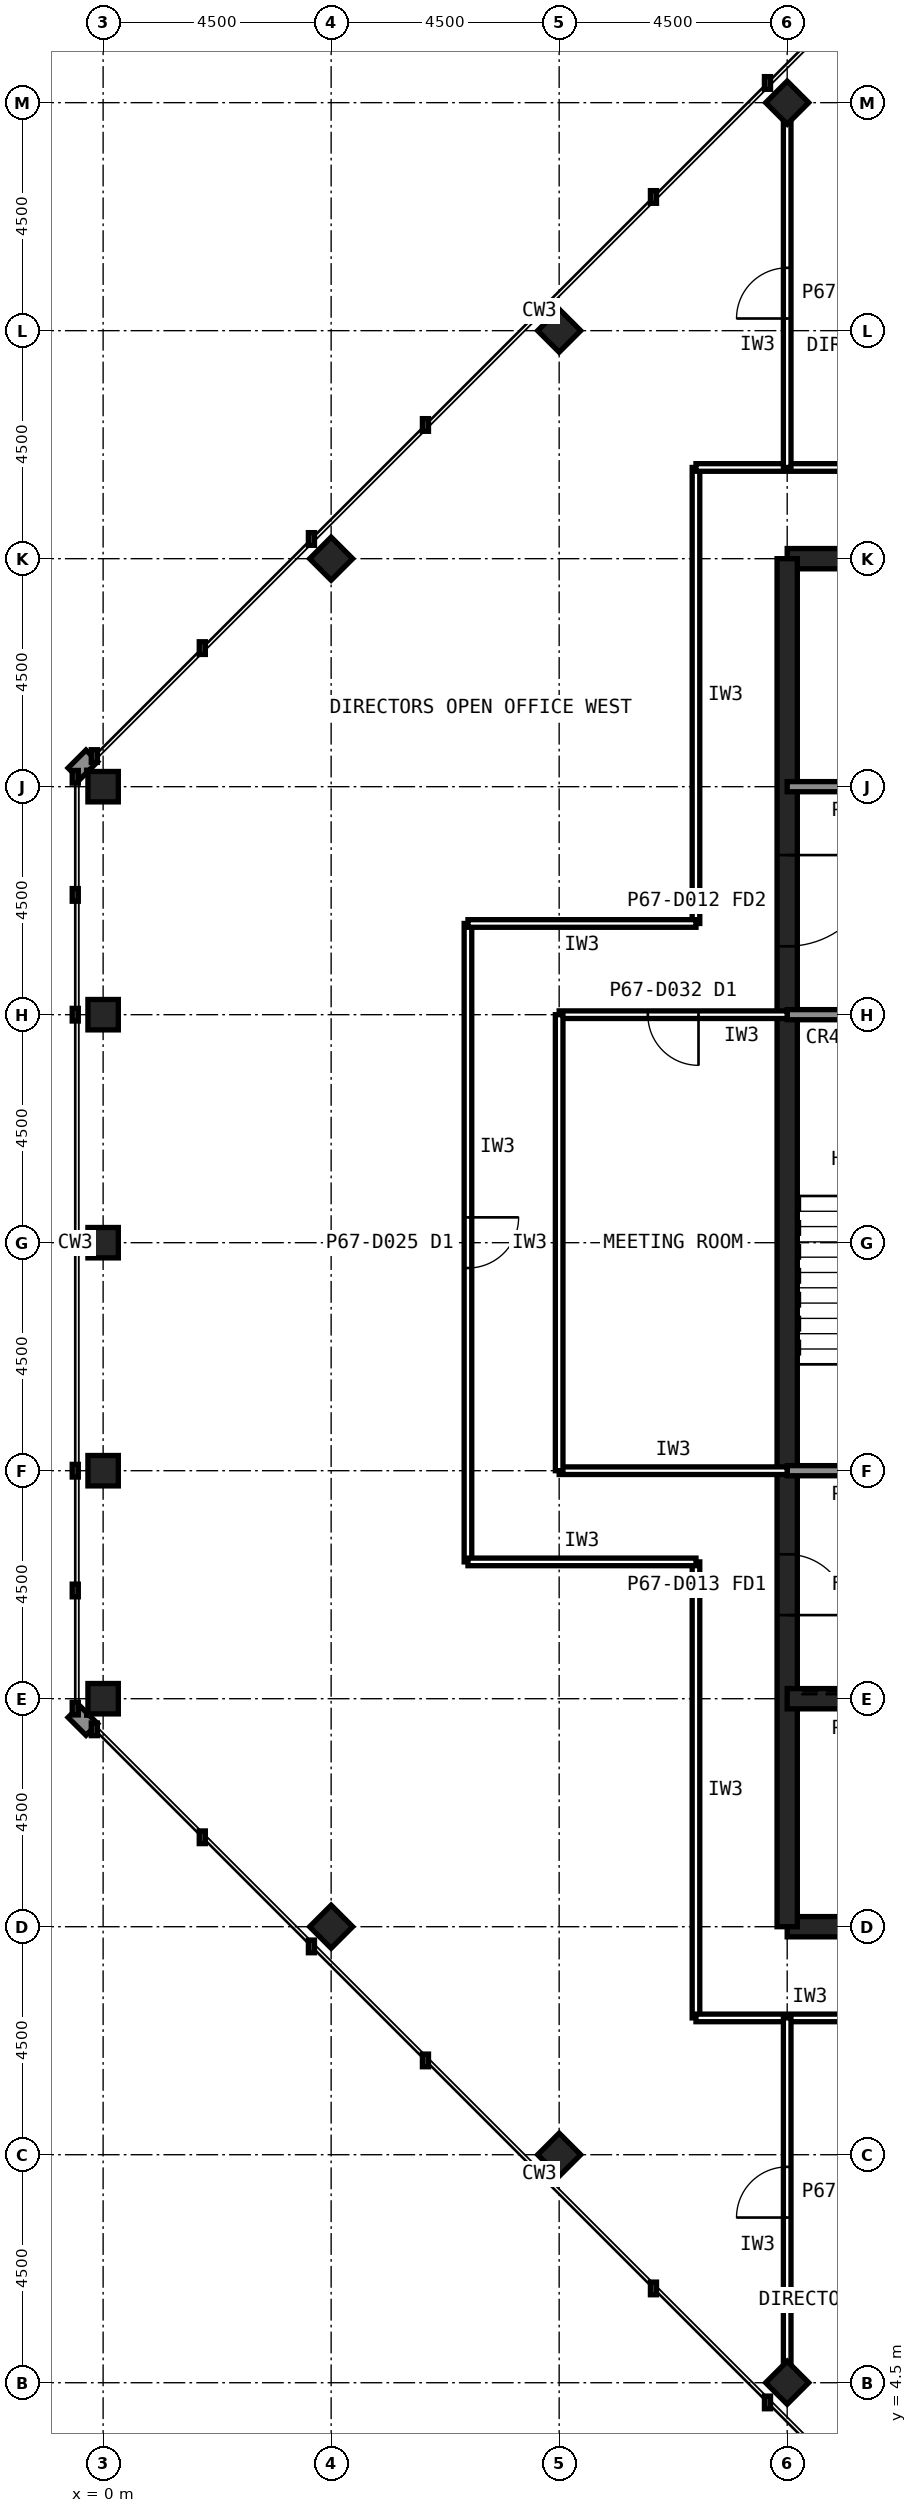
"""IFC4 building model, lengths in metres.
Left out: names, types, materials, properties, quantities, classifications, styles, units other than length and angle.
Written with IfcOpenShell. Run it as: python <this file> out.ifc"""

import sys

from ifc_helpers import new_model, si_unit, direction, frame, frame_2d, origin, origin_2d, place, context, subcontext, project, spatial, rectangle, hollow_rectangle, extrude, element, fill, save


model = new_model("IFC4")
c1 = context("Model", 3, precision=1e-05, world=origin(), true_north=direction((0.0, 1.0)))
c2 = subcontext(c1, "Body", "Model", "MODEL_VIEW")
j1 = project(units=[si_unit("LENGTHUNIT", "METRE"), si_unit("PLANEANGLEUNIT", "RADIAN")], contexts=[c1])
p1 = place(None, origin())
s1 = spatial("IfcSite", under=j1, at=p1, CompositionType="ELEMENT")
p2 = place(p1, origin())
s2 = spatial("IfcBuilding", under=s1, at=p2, CompositionType="ELEMENT")
p3 = place(p2, frame((0.0, 0.0, 278.6)))
s3 = spatial("IfcBuildingStorey", under=s2, at=p3, CompositionType="ELEMENT", Elevation=278.6)
for number, where, z_axis, x_axis in (
    (1, (0.0, 36.0, 0.0), (0.0, 0.0, 1.0), (1.0, 0.0, 0.0)),
    (2, (0.0, 31.5, 0.0), (0.0, 0.0, 1.0), (1.0, 0.0, 0.0)),
    (3, (0.0, 27.0, 0.0), (0.0, 0.0, 1.0), (1.0, 0.0, 0.0)),
    (4, (0.0, 22.5, 0.0), (0.0, 0.0, 1.0), (1.0, 0.0, 0.0)),
    (5, (0.0, 18.0, 0.0), (0.0, 0.0, 1.0), (1.0, 0.0, 0.0)),
    (6, (13.5, 4.5, 0.0), (0.0, 0.0, 1.0), (0.707, 0.707, 0.0)),
    (7, (9.0, 9.0, 0.0), (0.0, 0.0, 1.0), (0.707, 0.707, 0.0)),
    (8, (4.5, 13.5, 0.0), (0.0, 0.0, 1.0), (0.707, 0.707, 0.0)),
    (9, (4.5, 40.5, 0.0), (0.0, 0.0, 1.0), (0.707, 0.707, 0.0)),
    (10, (9.0, 45.0, 0.0), (0.0, 0.0, 1.0), (0.707, 0.707, 0.0)),
    (11, (13.5, 49.5, 0.0), (0.0, 0.0, 1.0), (0.707, 0.707, 0.0)),
):
    element("IfcColumn", number, at=place(p3, frame(where, z_axis=z_axis, x_axis=x_axis)), inside=s3, PredefinedType="COLUMN", context=c2, shape_type="SweptSolid", body=[
        extrude(hollow_rectangle(XDim=0.6, YDim=0.6, WallThickness=0.028, at=origin_2d()), origin(), (0.0, 0.0, 1.0), 4.0),
    ])
for number, where, z_axis, x_axis in (
    (12, (13.5, 13.5, 0.0), (0.0, 0.0, 1.0), (1.0, 0.0, 0.0)),
    (13, (40.5, 40.5, 0.0), (0.0, 0.0, 1.0), (-1.0, 0.0, 0.0)),
):
    element("IfcWall", number, at=place(p3, frame(where, z_axis=z_axis, x_axis=x_axis)), inside=s3, PredefinedType="SHEAR", context=c2, shape_type="SweptSolid", body=[
        extrude(rectangle(XDim=27.0, YDim=0.4, at=frame_2d((13.5, 0.0))), origin(), (0.0, 0.0, 1.0), 4.0),
    ])
p4 = place(p3, frame((13.5, 40.5, 0.0), z_axis=(0.0, 0.0, 1.0), x_axis=(0.0, -1.0, 0.0)))
e14 = element("IfcWall", 14, at=p4, inside=s3, PredefinedType="SHEAR", context=c2, shape_type="SweptSolid", body=[
    extrude(rectangle(XDim=27.0, YDim=0.4, at=frame_2d((13.5, 0.0))), origin(), (0.0, 0.0, 1.0), 4.0),
])
p5 = place(p4, frame((19.65, 0.0, 0.0)))
e15 = element("IfcOpeningElement", 15, at=p5, cuts=e14, PredefinedType="OPENING", context=c2, shape_type="SweptSolid", body=[
    extrude(rectangle(XDim=1.2, YDim=2.1, at=frame_2d((0.6, 1.05))), frame((0.0, 0.21, 0.0), z_axis=(0.0, -1.0, 0.0), x_axis=(1.0, 0.0, 0.0)), (0.0, 0.0, 1.0), 0.42),
])
p6 = place(p4, frame((5.85, 0.0, 0.0)))
e16 = element("IfcOpeningElement", 16, at=p6, cuts=e14, PredefinedType="OPENING", context=c2, shape_type="SweptSolid", body=[
    extrude(rectangle(XDim=1.8, YDim=2.1, at=frame_2d((0.9, 1.05))), frame((0.0, 0.21, 0.0), z_axis=(0.0, -1.0, 0.0), x_axis=(1.0, 0.0, 0.0)), (0.0, 0.0, 1.0), 0.42),
])
p7 = place(p3, frame((13.5, 18.0, 0.0), z_axis=(0.0, 0.0, 1.0), x_axis=(1.0, 0.0, 0.0)))
e17 = element("IfcWall", 17, at=p7, inside=s3, PredefinedType="SHEAR", context=c2, shape_type="SweptSolid", body=[
    extrude(rectangle(XDim=27.0, YDim=0.4, at=frame_2d((13.5, 0.0))), origin(), (0.0, 0.0, 1.0), 4.0),
])
p8 = place(p7, frame((24.3, 0.0, 0.0)))
e18 = element("IfcOpeningElement", 18, at=p8, cuts=e17, PredefinedType="OPENING", context=c2, shape_type="SweptSolid", body=[
    extrude(rectangle(XDim=0.9, YDim=2.1, at=frame_2d((0.45, 1.05))), frame((0.0, 0.21, 0.0), z_axis=(0.0, -1.0, 0.0), x_axis=(1.0, 0.0, 0.0)), (0.0, 0.0, 1.0), 0.42),
])
p9 = place(p7, frame((5.45, 0.0, 0.0)))
e19 = element("IfcOpeningElement", 19, at=p9, cuts=e17, PredefinedType="OPENING", context=c2, shape_type="SweptSolid", body=[
    extrude(rectangle(XDim=1.1, YDim=2.1, at=frame_2d((0.55, 1.05))), frame((0.0, 0.21, 0.0), z_axis=(0.0, -1.0, 0.0), x_axis=(1.0, 0.0, 0.0)), (0.0, 0.0, 1.0), 0.42),
])
p10 = place(p7, frame((8.45, 0.0, 0.0)))
e20 = element("IfcOpeningElement", 20, at=p10, cuts=e17, PredefinedType="OPENING", context=c2, shape_type="SweptSolid", body=[
    extrude(rectangle(XDim=1.1, YDim=2.1, at=frame_2d((0.55, 1.05))), frame((0.0, 0.21, 0.0), z_axis=(0.0, -1.0, 0.0), x_axis=(1.0, 0.0, 0.0)), (0.0, 0.0, 1.0), 0.42),
])
p11 = place(p7, frame((11.45, 0.0, 0.0)))
e21 = element("IfcOpeningElement", 21, at=p11, cuts=e17, PredefinedType="OPENING", context=c2, shape_type="SweptSolid", body=[
    extrude(rectangle(XDim=1.1, YDim=2.1, at=frame_2d((0.55, 1.05))), frame((0.0, 0.21, 0.0), z_axis=(0.0, -1.0, 0.0), x_axis=(1.0, 0.0, 0.0)), (0.0, 0.0, 1.0), 0.42),
])
p12 = place(p7, frame((14.45, 0.0, 0.0)))
e22 = element("IfcOpeningElement", 22, at=p12, cuts=e17, PredefinedType="OPENING", context=c2, shape_type="SweptSolid", body=[
    extrude(rectangle(XDim=1.1, YDim=2.1, at=frame_2d((0.55, 1.05))), frame((0.0, 0.21, 0.0), z_axis=(0.0, -1.0, 0.0), x_axis=(1.0, 0.0, 0.0)), (0.0, 0.0, 1.0), 0.42),
])
p13 = place(p7, frame((17.45, 0.0, 0.0)))
e23 = element("IfcOpeningElement", 23, at=p13, cuts=e17, PredefinedType="OPENING", context=c2, shape_type="SweptSolid", body=[
    extrude(rectangle(XDim=1.1, YDim=2.1, at=frame_2d((0.55, 1.05))), frame((0.0, 0.21, 0.0), z_axis=(0.0, -1.0, 0.0), x_axis=(1.0, 0.0, 0.0)), (0.0, 0.0, 1.0), 0.42),
])
p14 = place(p7, frame((20.45, 0.0, 0.0)))
e24 = element("IfcOpeningElement", 24, at=p14, cuts=e17, PredefinedType="OPENING", context=c2, shape_type="SweptSolid", body=[
    extrude(rectangle(XDim=1.1, YDim=2.1, at=frame_2d((0.55, 1.05))), frame((0.0, 0.21, 0.0), z_axis=(0.0, -1.0, 0.0), x_axis=(1.0, 0.0, 0.0)), (0.0, 0.0, 1.0), 0.42),
])
p15 = place(p7, frame((1.6, 0.0, 0.0)))
e25 = element("IfcOpeningElement", 25, at=p15, cuts=e17, PredefinedType="OPENING", context=c2, shape_type="SweptSolid", body=[
    extrude(rectangle(XDim=1.3, YDim=2.2, at=frame_2d((0.65, 1.1))), frame((0.0, 0.21, 0.0), z_axis=(0.0, -1.0, 0.0), x_axis=(1.0, 0.0, 0.0)), (0.0, 0.0, 1.0), 0.42),
])
p16 = place(p3, frame((13.5, 36.0, 0.0), z_axis=(0.0, 0.0, 1.0), x_axis=(1.0, 0.0, 0.0)))
e26 = element("IfcWall", 26, at=p16, inside=s3, PredefinedType="SOLIDWALL", context=c2, shape_type="SweptSolid", body=[
    extrude(rectangle(XDim=27.0, YDim=0.2, at=frame_2d((13.5, 0.0))), origin(), (0.0, 0.0, 1.0), 3.84),
])
p17 = place(p16, frame((1.8, 0.0, 0.0)))
e27 = element("IfcOpeningElement", 27, at=p17, cuts=e26, PredefinedType="OPENING", context=c2, shape_type="SweptSolid", body=[
    extrude(rectangle(XDim=0.9, YDim=2.1, at=frame_2d((0.45, 1.05))), frame((0.0, 0.11, 0.0), z_axis=(0.0, -1.0, 0.0), x_axis=(1.0, 0.0, 0.0)), (0.0, 0.0, 1.0), 0.22),
])
p18 = place(p16, frame((5.55, 0.0, 0.0)))
e28 = element("IfcOpeningElement", 28, at=p18, cuts=e26, PredefinedType="OPENING", context=c2, shape_type="SweptSolid", body=[
    extrude(rectangle(XDim=0.9, YDim=2.1, at=frame_2d((0.45, 1.05))), frame((0.0, 0.11, 0.0), z_axis=(0.0, -1.0, 0.0), x_axis=(1.0, 0.0, 0.0)), (0.0, 0.0, 1.0), 0.22),
])
p19 = place(p16, frame((11.55, 0.0, 0.0)))
e29 = element("IfcOpeningElement", 29, at=p19, cuts=e26, PredefinedType="OPENING", context=c2, shape_type="SweptSolid", body=[
    extrude(rectangle(XDim=0.9, YDim=2.1, at=frame_2d((0.45, 1.05))), frame((0.0, 0.11, 0.0), z_axis=(0.0, -1.0, 0.0), x_axis=(1.0, 0.0, 0.0)), (0.0, 0.0, 1.0), 0.22),
])
p20 = place(p16, frame((14.55, 0.0, 0.0)))
e30 = element("IfcOpeningElement", 30, at=p20, cuts=e26, PredefinedType="OPENING", context=c2, shape_type="SweptSolid", body=[
    extrude(rectangle(XDim=0.9, YDim=2.1, at=frame_2d((0.45, 1.05))), frame((0.0, 0.11, 0.0), z_axis=(0.0, -1.0, 0.0), x_axis=(1.0, 0.0, 0.0)), (0.0, 0.0, 1.0), 0.22),
])
p21 = place(p16, frame((20.55, 0.0, 0.0)))
e31 = element("IfcOpeningElement", 31, at=p21, cuts=e26, PredefinedType="OPENING", context=c2, shape_type="SweptSolid", body=[
    extrude(rectangle(XDim=0.9, YDim=2.1, at=frame_2d((0.45, 1.05))), frame((0.0, 0.11, 0.0), z_axis=(0.0, -1.0, 0.0), x_axis=(1.0, 0.0, 0.0)), (0.0, 0.0, 1.0), 0.22),
])
p22 = place(p16, frame((24.1, 0.0, 0.0)))
e32 = element("IfcOpeningElement", 32, at=p22, cuts=e26, PredefinedType="OPENING", context=c2, shape_type="SweptSolid", body=[
    extrude(rectangle(XDim=1.3, YDim=2.2, at=frame_2d((0.65, 1.1))), frame((0.0, 0.11, 0.0), z_axis=(0.0, -1.0, 0.0), x_axis=(1.0, 0.0, 0.0)), (0.0, 0.0, 1.0), 0.22),
])
p23 = place(p3, frame((13.5, 22.5, 0.0), z_axis=(0.0, 0.0, 1.0), x_axis=(1.0, 0.0, 0.0)))
e33 = element("IfcWall", 33, at=p23, inside=s3, PredefinedType="SOLIDWALL", context=c2, shape_type="SweptSolid", body=[
    extrude(rectangle(XDim=27.0, YDim=0.2, at=frame_2d((13.5, 0.0))), origin(), (0.0, 0.0, 1.0), 3.84),
])
p24 = place(p23, frame((1.65, 0.0, 0.0)))
e34 = element("IfcOpeningElement", 34, at=p24, cuts=e33, PredefinedType="OPENING", context=c2, shape_type="SweptSolid", body=[
    extrude(rectangle(XDim=1.2, YDim=2.1, at=frame_2d((0.6, 1.05))), frame((0.0, 0.11, 0.0), z_axis=(0.0, -1.0, 0.0), x_axis=(1.0, 0.0, 0.0)), (0.0, 0.0, 1.0), 0.22),
])
p25 = place(p23, frame((6.025, 0.0, 0.0)))
e35 = element("IfcOpeningElement", 35, at=p25, cuts=e33, PredefinedType="OPENING", context=c2, shape_type="SweptSolid", body=[
    extrude(rectangle(XDim=1.0, YDim=2.1, at=frame_2d((0.5, 1.05))), frame((0.0, 0.11, 0.0), z_axis=(0.0, -1.0, 0.0), x_axis=(1.0, 0.0, 0.0)), (0.0, 0.0, 1.0), 0.22),
])
p26 = place(p23, frame((10.525, 0.0, 0.0)))
e36 = element("IfcOpeningElement", 36, at=p26, cuts=e33, PredefinedType="OPENING", context=c2, shape_type="SweptSolid", body=[
    extrude(rectangle(XDim=1.0, YDim=2.1, at=frame_2d((0.5, 1.05))), frame((0.0, 0.11, 0.0), z_axis=(0.0, -1.0, 0.0), x_axis=(1.0, 0.0, 0.0)), (0.0, 0.0, 1.0), 0.22),
])
p27 = place(p23, frame((19.75, 0.0, 0.0)))
e37 = element("IfcOpeningElement", 37, at=p27, cuts=e33, PredefinedType="OPENING", context=c2, shape_type="SweptSolid", body=[
    extrude(rectangle(XDim=1.0, YDim=2.1, at=frame_2d((0.5, 1.05))), frame((0.0, 0.11, 0.0), z_axis=(0.0, -1.0, 0.0), x_axis=(1.0, 0.0, 0.0)), (0.0, 0.0, 1.0), 0.22),
])
p28 = place(p23, frame((15.05, 0.0, 0.0)))
e38 = element("IfcOpeningElement", 38, at=p28, cuts=e33, PredefinedType="OPENING", context=c2, shape_type="SweptSolid", body=[
    extrude(rectangle(XDim=1.4, YDim=2.4, at=frame_2d((0.7, 1.2))), frame((0.0, 0.11, 0.0), z_axis=(0.0, -1.0, 0.0), x_axis=(1.0, 0.0, 0.0)), (0.0, 0.0, 1.0), 0.22),
])
p29 = place(p3, frame((13.5, 31.5, 0.0), z_axis=(0.0, 0.0, 1.0), x_axis=(1.0, 0.0, 0.0)))
e39 = element("IfcWall", 39, at=p29, inside=s3, PredefinedType="SOLIDWALL", context=c2, shape_type="SweptSolid", body=[
    extrude(rectangle(XDim=27.0, YDim=0.2, at=frame_2d((13.5, 0.0))), origin(), (0.0, 0.0, 1.0), 3.84),
])
p30 = place(p29, frame((24.15, 0.0, 0.0)))
e40 = element("IfcOpeningElement", 40, at=p30, cuts=e39, PredefinedType="OPENING", context=c2, shape_type="SweptSolid", body=[
    extrude(rectangle(XDim=1.2, YDim=2.1, at=frame_2d((0.6, 1.05))), frame((0.0, 0.11, 0.0), z_axis=(0.0, -1.0, 0.0), x_axis=(1.0, 0.0, 0.0)), (0.0, 0.0, 1.0), 0.22),
])
p31 = place(p29, frame((15.3, 0.0, 0.0)))
e41 = element("IfcOpeningElement", 41, at=p31, cuts=e39, PredefinedType="OPENING", context=c2, shape_type="SweptSolid", body=[
    extrude(rectangle(XDim=0.9, YDim=2.1, at=frame_2d((0.45, 1.05))), frame((0.0, 0.11, 0.0), z_axis=(0.0, -1.0, 0.0), x_axis=(1.0, 0.0, 0.0)), (0.0, 0.0, 1.0), 0.22),
])
p32 = place(p29, frame((19.8, 0.0, 0.0)))
e42 = element("IfcOpeningElement", 42, at=p32, cuts=e39, PredefinedType="OPENING", context=c2, shape_type="SweptSolid", body=[
    extrude(rectangle(XDim=0.9, YDim=2.1, at=frame_2d((0.45, 1.05))), frame((0.0, 0.11, 0.0), z_axis=(0.0, -1.0, 0.0), x_axis=(1.0, 0.0, 0.0)), (0.0, 0.0, 1.0), 0.22),
])
p33 = place(p3, frame((7.2, 33.3, 0.0), z_axis=(0.0, 0.0, 1.0), x_axis=(0.0, -1.0, 0.0)))
e43 = element("IfcWall", 43, at=p33, inside=s3, PredefinedType="PARTITIONING", context=c2, shape_type="SweptSolid", body=[
    extrude(rectangle(XDim=12.6, YDim=0.15, at=frame_2d((6.3, 0.0))), origin(), (0.0, 0.0, 1.0), 3.84),
])
p34 = place(p33, frame((5.8, 0.0, 0.0)))
e44 = element("IfcOpeningElement", 44, at=p34, cuts=e43, PredefinedType="OPENING", context=c2, shape_type="SweptSolid", body=[
    extrude(rectangle(XDim=1.0, YDim=2.1, at=frame_2d((0.5, 1.05))), frame((0.0, 0.085, 0.0), z_axis=(0.0, -1.0, 0.0), x_axis=(1.0, 0.0, 0.0)), (0.0, 0.0, 1.0), 0.17),
])
for number, where, z_axis, x_axis in (
    (45, (11.7, 20.7, 0.0), (0.0, 0.0, 1.0), (0.0, -1.0, 0.0)),
    (46, (11.7, 42.3, 0.0), (0.0, 0.0, 1.0), (0.0, -1.0, 0.0)),
    (47, (20.7, 42.3, 0.0), (0.0, 0.0, 1.0), (-1.0, 0.0, 0.0)),
):
    element("IfcWall", number, at=place(p3, frame(where, z_axis=z_axis, x_axis=x_axis)), inside=s3, PredefinedType="PARTITIONING", context=c2, shape_type="SweptSolid", body=[
        extrude(rectangle(XDim=9.0, YDim=0.15, at=frame_2d((4.5, 0.0))), origin(), (0.0, 0.0, 1.0), 3.84),
    ])
for number, where, z_axis, x_axis in (
    (48, (7.2, 20.7, 0.0), (0.0, 0.0, 1.0), (1.0, 0.0, 0.0)),
    (49, (11.7, 11.7, 0.0), (0.0, 0.0, 1.0), (1.0, 0.0, 0.0)),
    (50, (11.7, 33.3, 0.0), (0.0, 0.0, 1.0), (-1.0, 0.0, 0.0)),
):
    element("IfcWall", number, at=place(p3, frame(where, z_axis=z_axis, x_axis=x_axis)), inside=s3, PredefinedType="PARTITIONING", context=c2, shape_type="SweptSolid", body=[
        extrude(rectangle(XDim=4.5, YDim=0.15, at=frame_2d((2.25, 0.0))), origin(), (0.0, 0.0, 1.0), 3.84),
    ])
p35 = place(p3, frame((9.0, 22.5, 0.0), z_axis=(0.0, 0.0, 1.0), x_axis=(1.0, 0.0, 0.0)))
e51 = element("IfcWall", 51, at=p35, inside=s3, PredefinedType="PARTITIONING", context=c2, shape_type="SweptSolid", body=[
    extrude(rectangle(XDim=4.5, YDim=0.15, at=frame_2d((2.25, 0.0))), origin(), (0.0, 0.0, 1.0), 2.989),
])
p36 = place(p3, frame((13.5, 31.5, 0.0), z_axis=(0.0, 0.0, 1.0), x_axis=(-1.0, 0.0, 0.0)))
e52 = element("IfcWall", 52, at=p36, inside=s3, PredefinedType="PARTITIONING", context=c2, shape_type="SweptSolid", body=[
    extrude(rectangle(XDim=4.5, YDim=0.15, at=frame_2d((2.25, 0.0))), origin(), (0.0, 0.0, 1.0), 2.989),
])
p37 = place(p36, frame((1.75, 0.0, 0.0)))
e53 = element("IfcOpeningElement", 53, at=p37, cuts=e52, PredefinedType="OPENING", context=c2, shape_type="SweptSolid", body=[
    extrude(rectangle(XDim=1.0, YDim=2.1, at=frame_2d((0.5, 1.05))), frame((0.0, 0.085, 0.0), z_axis=(0.0, -1.0, 0.0), x_axis=(1.0, 0.0, 0.0)), (0.0, 0.0, 1.0), 0.17),
])
p38 = place(p3, frame((9.0, 31.5, 0.0), z_axis=(0.0, 0.0, 1.0), x_axis=(0.0, -1.0, 0.0)))
e54 = element("IfcWall", 54, at=p38, inside=s3, PredefinedType="PARTITIONING", context=c2, shape_type="SweptSolid", body=[
    extrude(rectangle(XDim=9.0, YDim=0.15, at=frame_2d((4.5, 0.0))), origin(), (0.0, 0.0, 1.0), 3.84),
])
p39 = place(p3, frame((13.5, 42.3, 0.0), z_axis=(0.0, 0.0, 1.0), x_axis=(0.0, 1.0, 0.0)))
e55 = element("IfcWall", 55, at=p39, inside=s3, PredefinedType="PARTITIONING", context=c2, shape_type="SweptSolid", body=[
    extrude(rectangle(XDim=6.88, YDim=0.15, at=frame_2d((3.44, 0.0))), origin(), (0.0, 0.0, 1.0), 2.989),
])
p40 = place(p39, frame((2.94, 0.0, 0.0)))
e56 = element("IfcOpeningElement", 56, at=p40, cuts=e55, PredefinedType="OPENING", context=c2, shape_type="SweptSolid", body=[
    extrude(rectangle(XDim=1.0, YDim=2.1, at=frame_2d((0.5, 1.05))), frame((0.0, 0.085, 0.0), z_axis=(0.0, -1.0, 0.0), x_axis=(1.0, 0.0, 0.0)), (0.0, 0.0, 1.0), 0.17),
])
p41 = place(p3, frame((13.5, 4.82, 0.0), z_axis=(0.0, 0.0, 1.0), x_axis=(0.0, 1.0, 0.0)))
e57 = element("IfcWall", 57, at=p41, inside=s3, PredefinedType="PARTITIONING", context=c2, shape_type="SweptSolid", body=[
    extrude(rectangle(XDim=6.88, YDim=0.15, at=frame_2d((3.44, 0.0))), origin(), (0.0, 0.0, 1.0), 2.989),
])
p42 = place(p41, frame((2.94, 0.0, 0.0)))
e58 = element("IfcOpeningElement", 58, at=p42, cuts=e57, PredefinedType="OPENING", context=c2, shape_type="SweptSolid", body=[
    extrude(rectangle(XDim=1.0, YDim=2.1, at=frame_2d((0.5, 1.05))), frame((0.0, 0.085, 0.0), z_axis=(0.0, -1.0, 0.0), x_axis=(1.0, 0.0, 0.0)), (0.0, 0.0, 1.0), 0.17),
])
p43 = place(p5, origin())
e59 = element("IfcDoor", 59, at=p43, inside=s3, OperationType="SINGLE_SWING_RIGHT", PredefinedType="DOOR", context=c2, shape_type="SweptSolid", body=[
    extrude(rectangle(XDim=1.2, YDim=2.1, at=frame_2d((0.6, 1.05))), frame((0.0, 0.025, 0.0), z_axis=(0.0, -1.0, 0.0), x_axis=(1.0, 0.0, 0.0)), (0.0, 0.0, 1.0), 0.05),
])
fill(e15, e59)
p44 = place(p6, origin())
e60 = element("IfcDoor", 60, at=p44, inside=s3, OperationType="SINGLE_SWING_LEFT", PredefinedType="DOOR", context=c2, shape_type="SweptSolid", body=[
    extrude(rectangle(XDim=1.8, YDim=2.1, at=frame_2d((0.9, 1.05))), frame((0.0, 0.025, 0.0), z_axis=(0.0, -1.0, 0.0), x_axis=(1.0, 0.0, 0.0)), (0.0, 0.0, 1.0), 0.05),
])
fill(e16, e60)
p45 = place(p34, origin())
e61 = element("IfcDoor", 61, at=p45, inside=s3, OperationType="SINGLE_SWING_LEFT", PredefinedType="DOOR", context=c2, shape_type="SweptSolid", body=[
    extrude(rectangle(XDim=1.0, YDim=2.1, at=frame_2d((0.5, 1.05))), frame((0.0, 0.025, 0.0), z_axis=(0.0, -1.0, 0.0), x_axis=(1.0, 0.0, 0.0)), (0.0, 0.0, 1.0), 0.05),
])
fill(e44, e61)
p46 = place(p37, origin())
e62 = element("IfcDoor", 62, at=p46, inside=s3, OperationType="SINGLE_SWING_LEFT", PredefinedType="DOOR", context=c2, shape_type="SweptSolid", body=[
    extrude(rectangle(XDim=1.0, YDim=2.1, at=frame_2d((0.5, 1.05))), frame((0.0, 0.025, 0.0), z_axis=(0.0, -1.0, 0.0), x_axis=(1.0, 0.0, 0.0)), (0.0, 0.0, 1.0), 0.05),
])
fill(e53, e62)
p47 = place(p40, origin())
e63 = element("IfcDoor", 63, at=p47, inside=s3, OperationType="SINGLE_SWING_LEFT", PredefinedType="DOOR", context=c2, shape_type="SweptSolid", body=[
    extrude(rectangle(XDim=1.0, YDim=2.1, at=frame_2d((0.5, 1.05))), frame((0.0, 0.025, 0.0), z_axis=(0.0, -1.0, 0.0), x_axis=(1.0, 0.0, 0.0)), (0.0, 0.0, 1.0), 0.05),
])
fill(e56, e63)
p48 = place(p42, origin())
e64 = element("IfcDoor", 64, at=p48, inside=s3, OperationType="SINGLE_SWING_LEFT", PredefinedType="DOOR", context=c2, shape_type="SweptSolid", body=[
    extrude(rectangle(XDim=1.0, YDim=2.1, at=frame_2d((0.5, 1.05))), frame((0.0, 0.025, 0.0), z_axis=(0.0, -1.0, 0.0), x_axis=(1.0, 0.0, 0.0)), (0.0, 0.0, 1.0), 0.05),
])
fill(e58, e64)
save(model, sys.argv[1])
